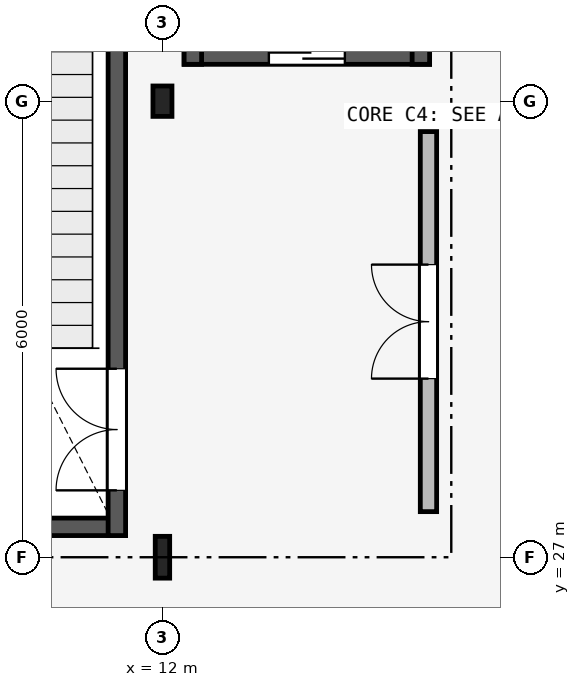
"""IFC4 building model, lengths in metres.
Left out: names, types, materials, properties, quantities, classifications, styles, units other than length and angle.
Written with IfcOpenShell. Run it as: python <this file> out.ifc"""

import sys

from ifc_helpers import new_model, si_unit, direction, frame, frame_2d, origin, origin_2d, place, context, subcontext, project, spatial, rectangle, i_section, extrude, element, fill, save


model = new_model("IFC4")
c1 = context("Model", 3, precision=1e-05, world=origin(), true_north=direction((0.0, 1.0)))
c2 = subcontext(c1, "Body", "Model", "MODEL_VIEW")
j1 = project(units=[si_unit("LENGTHUNIT", "METRE"), si_unit("PLANEANGLEUNIT", "RADIAN")], contexts=[c1])
p1 = place(None, origin())
s1 = spatial("IfcSite", under=j1, at=p1, CompositionType="ELEMENT")
p2 = place(p1, origin())
s2 = spatial("IfcBuilding", under=s1, at=p2, CompositionType="ELEMENT")
p3 = place(p2, frame((0.0, 0.0, 13.5)))
s3 = spatial("IfcBuildingStorey", under=s2, at=p3, CompositionType="ELEMENT", Elevation=13.5)
p4 = place(p3, frame((12.0, 27.0, 0.0), z_axis=(0.0, 0.0, 1.0), x_axis=(1.0, 0.0, 0.0)))
e1 = element("IfcColumn", 1, at=p4, inside=s3, PredefinedType="COLUMN", context=c2, shape_type="SweptSolid", body=[
    extrude(i_section(OverallWidth=0.19, OverallDepth=0.55, WebThickness=0.011, FlangeThickness=0.019, FilletRadius=0.018, at=origin_2d()), origin(), (0.0, 0.0, 1.0), 4.5),
])
p5 = place(p3, frame((12.0, 33.0, 0.0), z_axis=(0.0, 0.0, 1.0), x_axis=(1.0, 0.0, 0.0)))
e2 = element("IfcColumn", 2, at=p5, inside=s3, PredefinedType="COLUMN", context=c2, shape_type="SweptSolid", body=[
    extrude(i_section(OverallWidth=0.25, OverallDepth=0.4, WebThickness=0.01, FlangeThickness=0.013, FilletRadius=0.014, at=origin_2d()), origin(), (0.0, 0.0, 1.0), 4.5),
])
p6 = place(p3, frame((6.485, 27.4, 0.0), z_axis=(0.0, 0.0, 1.0), x_axis=(1.0, 0.0, 0.0)))
e3 = element("IfcWall", 3, at=p6, inside=s3, PredefinedType="SHEAR", context=c2, shape_type="SweptSolid", body=[
    extrude(rectangle(XDim=5.03, YDim=0.23, at=frame_2d((2.515, 0.0))), origin(), (0.0, 0.0, 1.0), 4.36),
])
p7 = place(p3, frame((11.4, 27.285, 0.0), z_axis=(0.0, 0.0, 1.0), x_axis=(0.0, 1.0, 0.0)))
e4 = element("IfcWall", 4, at=p7, inside=s3, PredefinedType="SHEAR", context=c2, shape_type="SweptSolid", body=[
    extrude(rectangle(XDim=9.63, YDim=0.23, at=frame_2d((4.815, 0.0))), origin(), (0.0, 0.0, 1.0), 4.36),
])
p8 = place(p7, frame((0.595, 0.0, 0.0)))
e5 = element("IfcOpeningElement", 5, at=p8, cuts=e4, PredefinedType="OPENING", context=c2, shape_type="SweptSolid", body=[
    extrude(rectangle(XDim=1.6, YDim=2.2, at=frame_2d((0.8, 1.1))), frame((0.0, 0.125, 0.0), z_axis=(0.0, -1.0, 0.0), x_axis=(1.0, 0.0, 0.0)), (0.0, 0.0, 1.0), 0.25),
])
p9 = place(p3, frame((15.5, 27.6, 0.0), z_axis=(0.0, 0.0, 1.0), x_axis=(0.0, 1.0, 0.0)))
e6 = element("IfcWall", 6, at=p9, inside=s3, PredefinedType="PARTITIONING", context=c2, shape_type="SweptSolid", body=[
    extrude(rectangle(XDim=5.0, YDim=0.215, at=frame_2d((2.5, 0.0))), origin(), (0.0, 0.0, 1.0), 4.19),
])
p10 = place(p9, frame((1.75, 0.0, 0.0)))
e7 = element("IfcOpeningElement", 7, at=p10, cuts=e6, PredefinedType="OPENING", context=c2, shape_type="SweptSolid", body=[
    extrude(rectangle(XDim=1.5, YDim=2.15, at=frame_2d((0.75, 1.075))), frame((0.0, 0.117, 0.0), z_axis=(0.0, -1.0, 0.0), x_axis=(1.0, 0.0, 0.0)), (0.0, 0.0, 1.0), 0.235),
])
p11 = place(p3, frame((12.285, 33.6, 0.0), z_axis=(0.0, 0.0, 1.0), x_axis=(1.0, 0.0, 0.0)))
e8 = element("IfcWall", 8, at=p11, inside=s3, PredefinedType="SHEAR", context=c2, shape_type="SweptSolid", body=[
    extrude(rectangle(XDim=3.23, YDim=0.23, at=frame_2d((1.615, 0.0))), origin(), (0.0, 0.0, 1.0), 4.5),
])
p12 = place(p11, frame((1.115, 0.0, 0.0)))
e9 = element("IfcOpeningElement", 9, at=p12, cuts=e8, PredefinedType="OPENING", context=c2, shape_type="SweptSolid", body=[
    extrude(rectangle(XDim=1.0, YDim=2.15, at=frame_2d((0.5, 1.075))), frame((0.0, 0.125, 0.0), z_axis=(0.0, -1.0, 0.0), x_axis=(1.0, 0.0, 0.0)), (0.0, 0.0, 1.0), 0.25),
])
for number, where, z_axis, x_axis in (
    (10, (15.4, 33.485, 0.0), (0.0, 0.0, 1.0), (0.0, 1.0, 0.0)),
    (11, (12.4, 37.115, 0.0), (0.0, 0.0, 1.0), (0.0, -1.0, 0.0)),
):
    element("IfcWall", number, at=place(p3, frame(where, z_axis=z_axis, x_axis=x_axis)), inside=s3, PredefinedType="SHEAR", context=c2, shape_type="SweptSolid", body=[
        extrude(rectangle(XDim=3.63, YDim=0.23, at=frame_2d((1.815, 0.0))), origin(), (0.0, 0.0, 1.0), 4.5),
    ])
p13 = place(p8, origin())
e12 = element("IfcDoor", 12, at=p13, inside=s3, OperationType="DOUBLE_DOOR_SINGLE_SWING", PredefinedType="DOOR", context=c2, shape_type="SweptSolid", body=[
    extrude(rectangle(XDim=1.6, YDim=2.2, at=frame_2d((0.8, 1.1))), frame((0.0, 0.025, 0.0), z_axis=(0.0, -1.0, 0.0), x_axis=(1.0, 0.0, 0.0)), (0.0, 0.0, 1.0), 0.05),
])
fill(e5, e12)
p14 = place(p10, origin())
e13 = element("IfcDoor", 13, at=p14, inside=s3, OperationType="DOUBLE_DOOR_SINGLE_SWING", PredefinedType="DOOR", context=c2, shape_type="SweptSolid", body=[
    extrude(rectangle(XDim=1.5, YDim=2.15, at=frame_2d((0.75, 1.075))), frame((0.0, 0.025, 0.0), z_axis=(0.0, -1.0, 0.0), x_axis=(1.0, 0.0, 0.0)), (0.0, 0.0, 1.0), 0.05),
])
fill(e7, e13)
p15 = place(p12, origin())
e14 = element("IfcDoor", 14, at=p15, inside=s3, OperationType="SLIDING_TO_LEFT", PredefinedType="DOOR", context=c2, shape_type="SweptSolid", body=[
    extrude(rectangle(XDim=1.0, YDim=2.15, at=frame_2d((0.5, 1.075))), frame((0.0, 0.025, 0.0), z_axis=(0.0, -1.0, 0.0), x_axis=(1.0, 0.0, 0.0)), (0.0, 0.0, 1.0), 0.05),
])
fill(e9, e14)
save(model, sys.argv[1])
